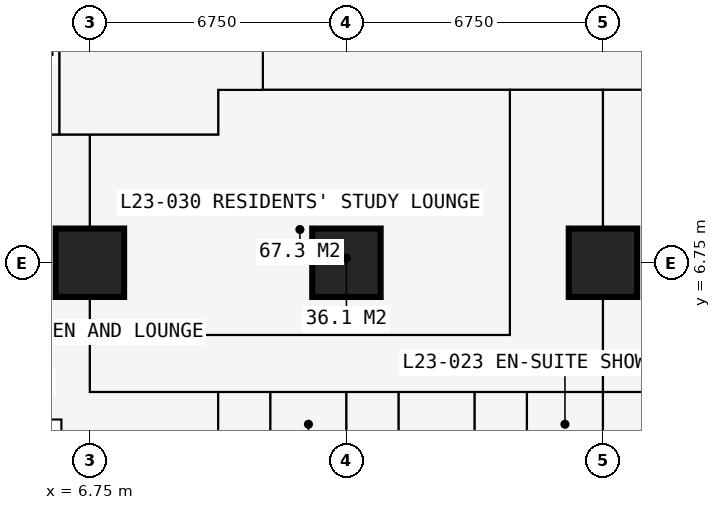
"""IFC4 building model, lengths in metres.
Left out: names, types, materials, properties, quantities, classifications, styles, units other than length and angle.
Written with IfcOpenShell. Run it as: python <this file> out.ifc"""

import sys

from ifc_helpers import new_model, si_unit, direction, frame, frame_2d, origin, origin_2d, place, context, subcontext, project, spatial, rectangle, extrude, element, fill, save


model = new_model("IFC4")
c1 = context("Model", 3, precision=1e-05, world=origin(), true_north=direction((0.0, 1.0)))
c2 = subcontext(c1, "Body", "Model", "MODEL_VIEW")
j1 = project(units=[si_unit("LENGTHUNIT", "METRE"), si_unit("PLANEANGLEUNIT", "RADIAN")], contexts=[c1])
p1 = place(None, origin())
s1 = spatial("IfcSite", under=j1, at=p1, CompositionType="ELEMENT")
p2 = place(p1, origin())
s2 = spatial("IfcBuilding", under=s1, at=p2, CompositionType="ELEMENT")
p3 = place(p2, frame((0.0, 0.0, 87.3)))
s3 = spatial("IfcBuildingStorey", under=s2, at=p3, CompositionType="ELEMENT", Elevation=87.3)
for number, where, z_axis, x_axis in (
    (1, (6.75, 6.75, 0.0), (0.0, 0.0, 1.0), (1.0, 0.0, 0.0)),
    (2, (13.5, 6.75, 0.0), (0.0, 0.0, 1.0), (1.0, 0.0, 0.0)),
    (3, (20.25, 6.75, 0.0), (0.0, 0.0, 1.0), (1.0, 0.0, 0.0)),
):
    element("IfcColumn", number, at=place(p3, frame(where, z_axis=z_axis, x_axis=x_axis)), inside=s3, PredefinedType="COLUMN", context=c2, shape_type="SweptSolid", body=[
        extrude(rectangle(XDim=1.8, YDim=1.8, at=origin_2d()), origin(), (0.0, 0.0, 1.0), 3.6),
    ])
p4 = place(p3, frame((2.625, 2.625, 0.0), z_axis=(0.0, 0.0, 1.0), x_axis=(1.0, 0.0, 0.0)))
e4 = element("IfcWall", 4, at=p4, inside=s3, PredefinedType="SOLIDWALL", context=c2, shape_type="SweptSolid", body=[
    extrude(rectangle(XDim=3.375, YDim=0.3, at=frame_2d((1.688, 0.0))), origin(), (0.0, 0.0, 1.0), 3.375),
])
p5 = place(p4, frame((0.788, 0.0, 0.6)))
e5 = element("IfcOpeningElement", 5, at=p5, cuts=e4, PredefinedType="OPENING", context=c2, shape_type="SweptSolid", body=[
    extrude(rectangle(XDim=1.8, YDim=2.1, at=frame_2d((0.9, 1.05))), frame((0.0, 0.16, 0.0), z_axis=(0.0, -1.0, 0.0), x_axis=(1.0, 0.0, 0.0)), (0.0, 0.0, 1.0), 0.32),
])
p6 = place(p3, frame((6.0, 2.625, 0.0), z_axis=(0.0, 0.0, 1.0), x_axis=(0.0, -1.0, 0.0)))
e6 = element("IfcWall", 6, at=p6, inside=s3, PredefinedType="SOLIDWALL", context=c2, shape_type="SweptSolid", body=[
    extrude(rectangle(XDim=3.375, YDim=0.3, at=frame_2d((1.688, 0.0))), origin(), (0.0, 0.0, 1.0), 3.375),
])
p7 = place(p6, frame((0.343, 0.0, 0.9)))
e7 = element("IfcOpeningElement", 7, at=p7, cuts=e6, PredefinedType="OPENING", context=c2, shape_type="SweptSolid", body=[
    extrude(rectangle(XDim=1.2, YDim=1.8, at=frame_2d((0.6, 0.9))), frame((0.0, 0.16, 0.0), z_axis=(0.0, -1.0, 0.0), x_axis=(1.0, 0.0, 0.0)), (0.0, 0.0, 1.0), 0.32),
])
p8 = place(p3, frame((-0.734, 10.125, 0.0), z_axis=(0.0, 0.0, 1.0), x_axis=(1.0, 0.0, 0.0)))
e8 = element("IfcWall", 8, at=p8, inside=s3, PredefinedType="PARTITIONING", context=c2, shape_type="SweptSolid", body=[
    extrude(rectangle(XDim=10.859, YDim=0.15, at=frame_2d((5.429, 0.0))), origin(), (0.0, 0.0, 1.0), 3.375),
])
p9 = place(p3, frame((5.95, 10.125, 0.0), z_axis=(0.0, 0.0, 1.0), x_axis=(0.0, 1.0, 0.0)))
e9 = element("IfcWall", 9, at=p9, inside=s3, PredefinedType="PARTITIONING", context=c2, shape_type="SweptSolid", body=[
    extrude(rectangle(XDim=2.65, YDim=0.15, at=frame_2d((1.325, 0.0))), origin(), (0.0, 0.0, 1.0), 3.375),
])
p10 = place(p3, frame((6.75, 3.35, 0.0), z_axis=(0.0, 0.0, 1.0), x_axis=(0.0, 1.0, 0.0)))
e10 = element("IfcWall", 10, at=p10, inside=s3, PredefinedType="PARTITIONING", context=c2, shape_type="SweptSolid", body=[
    extrude(rectangle(XDim=6.775, YDim=0.15, at=frame_2d((3.387, 0.0))), origin(), (0.0, 0.0, 1.0), 2.877),
])
p11 = place(p3, frame((6.75, 3.35, 0.0), z_axis=(0.0, 0.0, 1.0), x_axis=(1.0, 0.0, 0.0)))
e11 = element("IfcWall", 11, at=p11, inside=s3, PredefinedType="PARTITIONING", context=c2, shape_type="SweptSolid", body=[
    extrude(rectangle(XDim=23.625, YDim=0.1, at=frame_2d((11.812, 0.0))), origin(), (0.0, 0.0, 1.0), 3.375),
])
p12 = place(p11, frame((1.2, 0.0, 0.0)))
e12 = element("IfcOpeningElement", 12, at=p12, cuts=e11, PredefinedType="OPENING", context=c2, shape_type="SweptSolid", body=[
    extrude(rectangle(XDim=1.0, YDim=2.2, at=frame_2d((0.5, 1.1))), frame((0.0, 0.06, 0.0), z_axis=(0.0, -1.0, 0.0), x_axis=(1.0, 0.0, 0.0)), (0.0, 0.0, 1.0), 0.12),
])
p13 = place(p11, frame((3.575, 0.0, 0.0)))
e13 = element("IfcOpeningElement", 13, at=p13, cuts=e11, PredefinedType="OPENING", context=c2, shape_type="SweptSolid", body=[
    extrude(rectangle(XDim=0.95, YDim=2.2, at=frame_2d((0.475, 1.1))), frame((0.0, 0.06, 0.0), z_axis=(0.0, -1.0, 0.0), x_axis=(1.0, 0.0, 0.0)), (0.0, 0.0, 1.0), 0.12),
])
p14 = place(p11, frame((6.95, 0.0, 0.0)))
e14 = element("IfcOpeningElement", 14, at=p14, cuts=e11, PredefinedType="OPENING", context=c2, shape_type="SweptSolid", body=[
    extrude(rectangle(XDim=0.95, YDim=2.2, at=frame_2d((0.475, 1.1))), frame((0.0, 0.06, 0.0), z_axis=(0.0, -1.0, 0.0), x_axis=(1.0, 0.0, 0.0)), (0.0, 0.0, 1.0), 0.12),
])
p15 = place(p11, frame((10.325, 0.0, 0.0)))
e15 = element("IfcOpeningElement", 15, at=p15, cuts=e11, PredefinedType="OPENING", context=c2, shape_type="SweptSolid", body=[
    extrude(rectangle(XDim=0.95, YDim=2.2, at=frame_2d((0.475, 1.1))), frame((0.0, 0.06, 0.0), z_axis=(0.0, -1.0, 0.0), x_axis=(1.0, 0.0, 0.0)), (0.0, 0.0, 1.0), 0.12),
])
p16 = place(p11, frame((15.1, 0.0, 0.0)))
e16 = element("IfcOpeningElement", 16, at=p16, cuts=e11, PredefinedType="OPENING", context=c2, shape_type="SweptSolid", body=[
    extrude(rectangle(XDim=0.95, YDim=2.2, at=frame_2d((0.475, 1.1))), frame((0.0, 0.06, 0.0), z_axis=(0.0, -1.0, 0.0), x_axis=(1.0, 0.0, 0.0)), (0.0, 0.0, 1.0), 0.12),
])
p17 = place(p11, frame((20.45, 0.0, 0.0)))
e17 = element("IfcOpeningElement", 17, at=p17, cuts=e11, PredefinedType="OPENING", context=c2, shape_type="SweptSolid", body=[
    extrude(rectangle(XDim=0.95, YDim=2.2, at=frame_2d((0.475, 1.1))), frame((0.0, 0.06, 0.0), z_axis=(0.0, -1.0, 0.0), x_axis=(1.0, 0.0, 0.0)), (0.0, 0.0, 1.0), 0.12),
])
p18 = place(p3, frame((6.75, 4.85, 0.0), z_axis=(0.0, 0.0, 1.0), x_axis=(1.0, 0.0, 0.0)))
e18 = element("IfcWall", 18, at=p18, inside=s3, PredefinedType="PARTITIONING", context=c2, shape_type="SweptSolid", body=[
    extrude(rectangle(XDim=11.05, YDim=0.15, at=frame_2d((5.525, 0.0))), origin(), (0.0, 0.0, 1.0), 3.375),
])
p19 = place(p3, frame((10.125, -0.734, 0.0), z_axis=(0.0, 0.0, 1.0), x_axis=(0.0, 1.0, 0.0)))
e19 = element("IfcWall", 19, at=p19, inside=s3, PredefinedType="PARTITIONING", context=c2, shape_type="SweptSolid", body=[
    extrude(rectangle(XDim=4.084, YDim=0.15, at=frame_2d((2.042, 0.0))), origin(), (0.0, 0.0, 1.0), 3.375),
])
p20 = place(p3, frame((10.125, 10.125, 0.0), z_axis=(0.0, 0.0, 1.0), x_axis=(0.0, 1.0, 0.0)))
e20 = element("IfcWall", 20, at=p20, inside=s3, PredefinedType="PARTITIONING", context=c2, shape_type="SweptSolid", body=[
    extrude(rectangle(XDim=1.175, YDim=0.15, at=frame_2d((0.587, 0.0))), origin(), (0.0, 0.0, 1.0), 3.375),
])
p21 = place(p3, frame((10.125, 11.3, 0.0), z_axis=(0.0, 0.0, 1.0), x_axis=(1.0, 0.0, 0.0)))
e21 = element("IfcWall", 21, at=p21, inside=s3, PredefinedType="PARTITIONING", context=c2, shape_type="SweptSolid", body=[
    extrude(rectangle(XDim=20.675, YDim=0.15, at=frame_2d((10.337, 0.0))), origin(), (0.0, 0.0, 1.0), 3.375),
])
p22 = place(p21, frame((8.375, 0.0, 0.0)))
e22 = element("IfcOpeningElement", 22, at=p22, cuts=e21, PredefinedType="OPENING", context=c2, shape_type="SweptSolid", body=[
    extrude(rectangle(XDim=1.0, YDim=2.2, at=frame_2d((0.5, 1.1))), frame((0.0, 0.085, 0.0), z_axis=(0.0, -1.0, 0.0), x_axis=(1.0, 0.0, 0.0)), (0.0, 0.0, 1.0), 0.17),
])
p23 = place(p21, frame((10.975, 0.0, 0.0)))
e23 = element("IfcOpeningElement", 23, at=p23, cuts=e21, PredefinedType="OPENING", context=c2, shape_type="SweptSolid", body=[
    extrude(rectangle(XDim=1.0, YDim=2.2, at=frame_2d((0.5, 1.1))), frame((0.0, 0.085, 0.0), z_axis=(0.0, -1.0, 0.0), x_axis=(1.0, 0.0, 0.0)), (0.0, 0.0, 1.0), 0.17),
])
p24 = place(p21, frame((3.925, 0.0, 0.0)))
e24 = element("IfcOpeningElement", 24, at=p24, cuts=e21, PredefinedType="OPENING", context=c2, shape_type="SweptSolid", body=[
    extrude(rectangle(XDim=0.95, YDim=2.2, at=frame_2d((0.475, 1.1))), frame((0.0, 0.085, 0.0), z_axis=(0.0, -1.0, 0.0), x_axis=(1.0, 0.0, 0.0)), (0.0, 0.0, 1.0), 0.17),
])
p25 = place(p3, frame((11.3, 11.3, 0.0), z_axis=(0.0, 0.0, 1.0), x_axis=(0.0, 1.0, 0.0)))
e25 = element("IfcWall", 25, at=p25, inside=s3, PredefinedType="PARTITIONING", context=c2, shape_type="SweptSolid", body=[
    extrude(rectangle(XDim=19.3, YDim=0.15, at=frame_2d((9.65, 0.0))), origin(), (0.0, 0.0, 1.0), 3.375),
])
p26 = place(p25, frame((18.1, 0.0, 0.0)))
e26 = element("IfcOpeningElement", 26, at=p26, cuts=e25, PredefinedType="OPENING", context=c2, shape_type="SweptSolid", body=[
    extrude(rectangle(XDim=1.0, YDim=2.2, at=frame_2d((0.5, 1.1))), frame((0.0, 0.085, 0.0), z_axis=(0.0, -1.0, 0.0), x_axis=(1.0, 0.0, 0.0)), (0.0, 0.0, 1.0), 0.17),
])
p27 = place(p25, frame((10.137, 0.0, 0.0)))
e27 = element("IfcOpeningElement", 27, at=p27, cuts=e25, PredefinedType="OPENING", context=c2, shape_type="SweptSolid", body=[
    extrude(rectangle(XDim=1.0, YDim=2.2, at=frame_2d((0.5, 1.1))), frame((0.0, 0.085, 0.0), z_axis=(0.0, -1.0, 0.0), x_axis=(1.0, 0.0, 0.0)), (0.0, 0.0, 1.0), 0.17),
])
p28 = place(p3, frame((11.5, 1.15, 0.0), z_axis=(0.0, 0.0, 1.0), x_axis=(0.0, 1.0, 0.0)))
e28 = element("IfcWall", 28, at=p28, inside=s3, PredefinedType="PARTITIONING", context=c2, shape_type="SweptSolid", body=[
    extrude(rectangle(XDim=2.2, YDim=0.1, at=frame_2d((1.1, 0.0))), origin(), (0.0, 0.0, 1.0), 3.375),
])
p29 = place(p28, frame((0.65, 0.0, 0.0)))
e29 = element("IfcOpeningElement", 29, at=p29, cuts=e28, PredefinedType="OPENING", context=c2, shape_type="SweptSolid", body=[
    extrude(rectangle(XDim=0.9, YDim=2.2, at=frame_2d((0.45, 1.1))), frame((0.0, 0.06, 0.0), z_axis=(0.0, -1.0, 0.0), x_axis=(1.0, 0.0, 0.0)), (0.0, 0.0, 1.0), 0.12),
])
p30 = place(p3, frame((13.5, -0.734, 0.0), z_axis=(0.0, 0.0, 1.0), x_axis=(0.0, 1.0, 0.0)))
e30 = element("IfcWall", 30, at=p30, inside=s3, PredefinedType="PARTITIONING", context=c2, shape_type="SweptSolid", body=[
    extrude(rectangle(XDim=4.084, YDim=0.1, at=frame_2d((2.042, 0.0))), origin(), (0.0, 0.0, 1.0), 2.877),
])
p31 = place(p3, frame((14.875, 1.15, 0.0), z_axis=(0.0, 0.0, 1.0), x_axis=(0.0, 1.0, 0.0)))
e31 = element("IfcWall", 31, at=p31, inside=s3, PredefinedType="PARTITIONING", context=c2, shape_type="SweptSolid", body=[
    extrude(rectangle(XDim=2.2, YDim=0.1, at=frame_2d((1.1, 0.0))), origin(), (0.0, 0.0, 1.0), 3.375),
])
p32 = place(p31, frame((0.65, 0.0, 0.0)))
e32 = element("IfcOpeningElement", 32, at=p32, cuts=e31, PredefinedType="OPENING", context=c2, shape_type="SweptSolid", body=[
    extrude(rectangle(XDim=0.9, YDim=2.2, at=frame_2d((0.45, 1.1))), frame((0.0, 0.06, 0.0), z_axis=(0.0, -1.0, 0.0), x_axis=(1.0, 0.0, 0.0)), (0.0, 0.0, 1.0), 0.12),
])
p33 = place(p3, frame((16.875, -0.734, 0.0), z_axis=(0.0, 0.0, 1.0), x_axis=(0.0, 1.0, 0.0)))
e33 = element("IfcWall", 33, at=p33, inside=s3, PredefinedType="PARTITIONING", context=c2, shape_type="SweptSolid", body=[
    extrude(rectangle(XDim=4.084, YDim=0.1, at=frame_2d((2.042, 0.0))), origin(), (0.0, 0.0, 1.0), 3.375),
])
p34 = place(p3, frame((17.8, 4.85, 0.0), z_axis=(0.0, 0.0, 1.0), x_axis=(0.0, 1.0, 0.0)))
e34 = element("IfcWall", 34, at=p34, inside=s3, PredefinedType="PARTITIONING", context=c2, shape_type="SweptSolid", body=[
    extrude(rectangle(XDim=6.45, YDim=0.15, at=frame_2d((3.225, 0.0))), origin(), (0.0, 0.0, 1.0), 3.375),
])
p35 = place(p3, frame((18.25, 1.15, 0.0), z_axis=(0.0, 0.0, 1.0), x_axis=(0.0, 1.0, 0.0)))
e35 = element("IfcWall", 35, at=p35, inside=s3, PredefinedType="PARTITIONING", context=c2, shape_type="SweptSolid", body=[
    extrude(rectangle(XDim=2.2, YDim=0.1, at=frame_2d((1.1, 0.0))), origin(), (0.0, 0.0, 1.0), 3.375),
])
p36 = place(p35, frame((0.65, 0.0, 0.0)))
e36 = element("IfcOpeningElement", 36, at=p36, cuts=e35, PredefinedType="OPENING", context=c2, shape_type="SweptSolid", body=[
    extrude(rectangle(XDim=0.9, YDim=2.2, at=frame_2d((0.45, 1.1))), frame((0.0, 0.06, 0.0), z_axis=(0.0, -1.0, 0.0), x_axis=(1.0, 0.0, 0.0)), (0.0, 0.0, 1.0), 0.12),
])
p37 = place(p3, frame((20.25, -0.734, 0.0), z_axis=(0.0, 0.0, 1.0), x_axis=(0.0, 1.0, 0.0)))
e37 = element("IfcWall", 37, at=p37, inside=s3, PredefinedType="PARTITIONING", context=c2, shape_type="SweptSolid", body=[
    extrude(rectangle(XDim=12.034, YDim=0.15, at=frame_2d((6.017, 0.0))), origin(), (0.0, 0.0, 1.0), 2.61),
])
p38 = place(p12, origin())
e38 = element("IfcDoor", 38, at=p38, inside=s3, OperationType="SINGLE_SWING_LEFT", PredefinedType="DOOR", context=c2, shape_type="SweptSolid", body=[
    extrude(rectangle(XDim=1.0, YDim=2.2, at=frame_2d((0.5, 1.1))), frame((0.0, 0.025, 0.0), z_axis=(0.0, -1.0, 0.0), x_axis=(1.0, 0.0, 0.0)), (0.0, 0.0, 1.0), 0.05),
])
fill(e12, e38)
p39 = place(p13, origin())
e39 = element("IfcDoor", 39, at=p39, inside=s3, OperationType="SINGLE_SWING_LEFT", PredefinedType="DOOR", context=c2, shape_type="SweptSolid", body=[
    extrude(rectangle(XDim=0.95, YDim=2.2, at=frame_2d((0.475, 1.1))), frame((0.0, 0.025, 0.0), z_axis=(0.0, -1.0, 0.0), x_axis=(1.0, 0.0, 0.0)), (0.0, 0.0, 1.0), 0.05),
])
fill(e13, e39)
p40 = place(p29, origin())
e40 = element("IfcDoor", 40, at=p40, inside=s3, OperationType="SINGLE_SWING_RIGHT", PredefinedType="DOOR", context=c2, shape_type="SweptSolid", body=[
    extrude(rectangle(XDim=0.9, YDim=2.2, at=frame_2d((0.45, 1.1))), frame((0.0, 0.025, 0.0), z_axis=(0.0, -1.0, 0.0), x_axis=(1.0, 0.0, 0.0)), (0.0, 0.0, 1.0), 0.05),
])
fill(e29, e40)
p41 = place(p14, origin())
e41 = element("IfcDoor", 41, at=p41, inside=s3, OperationType="SINGLE_SWING_LEFT", PredefinedType="DOOR", context=c2, shape_type="SweptSolid", body=[
    extrude(rectangle(XDim=0.95, YDim=2.2, at=frame_2d((0.475, 1.1))), frame((0.0, 0.025, 0.0), z_axis=(0.0, -1.0, 0.0), x_axis=(1.0, 0.0, 0.0)), (0.0, 0.0, 1.0), 0.05),
])
fill(e14, e41)
p42 = place(p32, origin())
e42 = element("IfcDoor", 42, at=p42, inside=s3, OperationType="SINGLE_SWING_RIGHT", PredefinedType="DOOR", context=c2, shape_type="SweptSolid", body=[
    extrude(rectangle(XDim=0.9, YDim=2.2, at=frame_2d((0.45, 1.1))), frame((0.0, 0.025, 0.0), z_axis=(0.0, -1.0, 0.0), x_axis=(1.0, 0.0, 0.0)), (0.0, 0.0, 1.0), 0.05),
])
fill(e32, e42)
p43 = place(p15, origin())
e43 = element("IfcDoor", 43, at=p43, inside=s3, OperationType="SINGLE_SWING_LEFT", PredefinedType="DOOR", context=c2, shape_type="SweptSolid", body=[
    extrude(rectangle(XDim=0.95, YDim=2.2, at=frame_2d((0.475, 1.1))), frame((0.0, 0.025, 0.0), z_axis=(0.0, -1.0, 0.0), x_axis=(1.0, 0.0, 0.0)), (0.0, 0.0, 1.0), 0.05),
])
fill(e15, e43)
p44 = place(p36, origin())
e44 = element("IfcDoor", 44, at=p44, inside=s3, OperationType="SINGLE_SWING_RIGHT", PredefinedType="DOOR", context=c2, shape_type="SweptSolid", body=[
    extrude(rectangle(XDim=0.9, YDim=2.2, at=frame_2d((0.45, 1.1))), frame((0.0, 0.025, 0.0), z_axis=(0.0, -1.0, 0.0), x_axis=(1.0, 0.0, 0.0)), (0.0, 0.0, 1.0), 0.05),
])
fill(e36, e44)
p45 = place(p22, origin())
e45 = element("IfcDoor", 45, at=p45, inside=s3, OperationType="SINGLE_SWING_LEFT", PredefinedType="DOOR", context=c2, shape_type="SweptSolid", body=[
    extrude(rectangle(XDim=1.0, YDim=2.2, at=frame_2d((0.5, 1.1))), frame((0.0, 0.025, 0.0), z_axis=(0.0, -1.0, 0.0), x_axis=(1.0, 0.0, 0.0)), (0.0, 0.0, 1.0), 0.05),
])
fill(e22, e45)
p46 = place(p23, origin())
e46 = element("IfcDoor", 46, at=p46, inside=s3, OperationType="SINGLE_SWING_LEFT", PredefinedType="DOOR", context=c2, shape_type="SweptSolid", body=[
    extrude(rectangle(XDim=1.0, YDim=2.2, at=frame_2d((0.5, 1.1))), frame((0.0, 0.025, 0.0), z_axis=(0.0, -1.0, 0.0), x_axis=(1.0, 0.0, 0.0)), (0.0, 0.0, 1.0), 0.05),
])
fill(e23, e46)
p47 = place(p24, origin())
e47 = element("IfcDoor", 47, at=p47, inside=s3, OperationType="SINGLE_SWING_LEFT", PredefinedType="DOOR", context=c2, shape_type="SweptSolid", body=[
    extrude(rectangle(XDim=0.95, YDim=2.2, at=frame_2d((0.475, 1.1))), frame((0.0, 0.025, 0.0), z_axis=(0.0, -1.0, 0.0), x_axis=(1.0, 0.0, 0.0)), (0.0, 0.0, 1.0), 0.05),
])
fill(e24, e47)
save(model, sys.argv[1])
